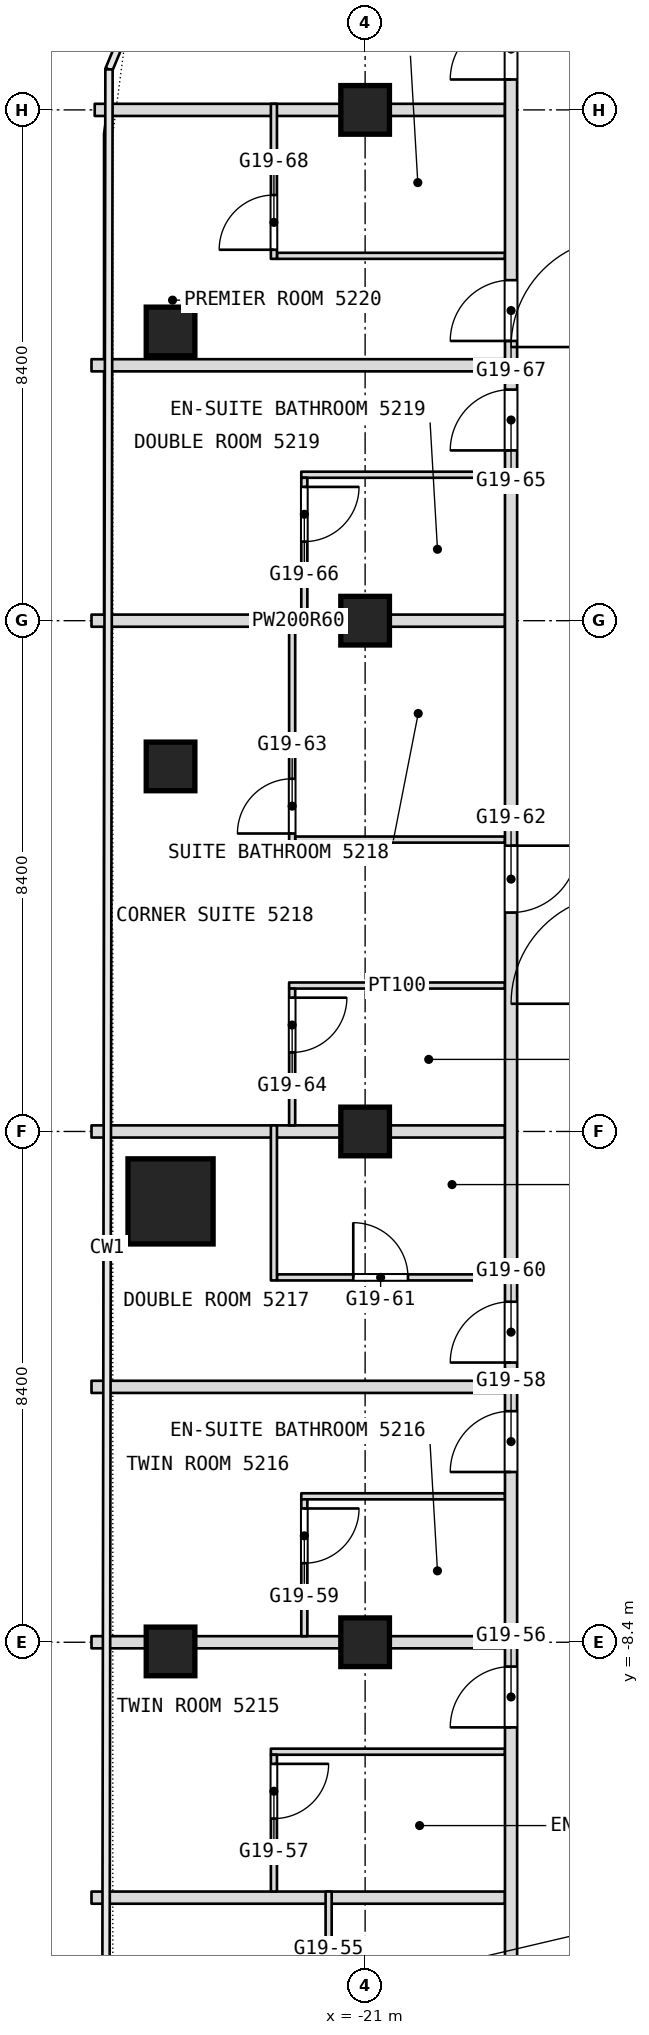
"""IFC4 building model, lengths in metres.
Left out: names, types, materials, properties, quantities, classifications, styles, units other than length and angle.
Written with IfcOpenShell. Run it as: python <this file> out.ifc"""

import sys

from ifc_helpers import new_model, si_unit, direction, frame, frame_2d, origin, origin_2d, place, context, subcontext, project, spatial, rectangle, extrude, element, fill, save


model = new_model("IFC4")
c1 = context("Model", 3, precision=1e-05, world=origin(), true_north=direction((0.0, 1.0)))
c2 = subcontext(c1, "Body", "Model", "MODEL_VIEW")
j1 = project(units=[si_unit("LENGTHUNIT", "METRE"), si_unit("PLANEANGLEUNIT", "RADIAN")], contexts=[c1])
p1 = place(None, origin())
s1 = spatial("IfcSite", under=j1, at=p1, CompositionType="ELEMENT")
p2 = place(p1, origin())
s2 = spatial("IfcBuilding", under=s1, at=p2, CompositionType="ELEMENT")
p3 = place(p2, frame((0.0, 0.0, 223.7)))
s3 = spatial("IfcBuildingStorey", under=s2, at=p3, CompositionType="ELEMENT", Elevation=223.7)
p4 = place(p3, frame((-24.2, -1.15, 0.0), z_axis=(0.0, 0.0, 1.0), x_axis=(1.0, 0.0, 0.0)))
e1 = element("IfcColumn", 1, at=p4, inside=s3, PredefinedType="COLUMN", context=c2, shape_type="SweptSolid", body=[
    extrude(rectangle(XDim=1.4, YDim=1.4, at=origin_2d()), origin(), (0.0, 0.0, 1.0), 3.6),
])
for number, where, z_axis, x_axis in (
    (2, (-21.0, -8.4, 0.0), (0.0, 0.0, 1.0), (1.0, 0.0, 0.0)),
    (3, (-21.0, 0.0, 0.0), (0.0, 0.0, 1.0), (1.0, 0.0, 0.0)),
    (4, (-21.0, 8.4, 0.0), (0.0, 0.0, 1.0), (1.0, 0.0, 0.0)),
    (5, (-21.0, 16.8, 0.0), (0.0, 0.0, 1.0), (1.0, 0.0, 0.0)),
    (6, (-24.2, -8.551, 0.0), (0.0, 0.0, 1.0), (1.0, 0.0, 0.0)),
    (7, (-24.2, 6.003, 0.0), (0.0, 0.0, 1.0), (1.0, 0.0, 0.0)),
    (8, (-24.2, 13.156, 0.0), (0.0, 0.0, 1.0), (1.0, 0.0, 0.0)),
):
    element("IfcColumn", number, at=place(p3, frame(where, z_axis=z_axis, x_axis=x_axis)), inside=s3, PredefinedType="COLUMN", context=c2, shape_type="SweptSolid", body=[
        extrude(rectangle(XDim=0.8, YDim=0.8, at=origin_2d()), origin(), (0.0, 0.0, 1.0), 3.6),
    ])
p5 = place(p3, frame((-25.5, -12.6, 0.0), z_axis=(0.0, 0.0, 1.0), x_axis=(1.0, 0.0, 0.0)))
e9 = element("IfcWall", 9, at=p5, inside=s3, PredefinedType="PARTITIONING", context=c2, shape_type="SweptSolid", body=[
    extrude(rectangle(XDim=6.8, YDim=0.2, at=frame_2d((3.4, 0.0))), origin(), (0.0, 0.0, 1.0), 3.34),
])
p6 = place(p3, frame((-22.55, -10.2, 0.0), z_axis=(0.0, 0.0, 1.0), x_axis=(1.0, 0.0, 0.0)))
e10 = element("IfcWall", 10, at=p6, inside=s3, PredefinedType="PARTITIONING", context=c2, shape_type="SweptSolid", body=[
    extrude(rectangle(XDim=3.85, YDim=0.1, at=frame_2d((1.925, 0.0))), origin(), (0.0, 0.0, 1.0), 3.34),
])
p7 = place(p3, frame((-25.5, -8.4, 0.0), z_axis=(0.0, 0.0, 1.0), x_axis=(1.0, 0.0, 0.0)))
e11 = element("IfcWall", 11, at=p7, inside=s3, PredefinedType="PARTITIONING", context=c2, shape_type="SweptSolid", body=[
    extrude(rectangle(XDim=6.8, YDim=0.2, at=frame_2d((3.4, 0.0))), origin(), (0.0, 0.0, 1.0), 2.94),
])
p8 = place(p3, frame((-22.05, -6.0, 0.0), z_axis=(0.0, 0.0, 1.0), x_axis=(1.0, 0.0, 0.0)))
e12 = element("IfcWall", 12, at=p8, inside=s3, PredefinedType="PARTITIONING", context=c2, shape_type="SweptSolid", body=[
    extrude(rectangle(XDim=3.35, YDim=0.1, at=frame_2d((1.675, 0.0))), origin(), (0.0, 0.0, 1.0), 3.34),
])
p9 = place(p3, frame((-25.5, -4.2, 0.0), z_axis=(0.0, 0.0, 1.0), x_axis=(1.0, 0.0, 0.0)))
e13 = element("IfcWall", 13, at=p9, inside=s3, PredefinedType="PARTITIONING", context=c2, shape_type="SweptSolid", body=[
    extrude(rectangle(XDim=6.8, YDim=0.2, at=frame_2d((3.4, 0.0))), origin(), (0.0, 0.0, 1.0), 3.34),
])
p10 = place(p3, frame((-22.45, -2.4, 0.0), z_axis=(0.0, 0.0, 1.0), x_axis=(1.0, 0.0, 0.0)))
e14 = element("IfcWall", 14, at=p10, inside=s3, PredefinedType="PARTITIONING", context=c2, shape_type="SweptSolid", body=[
    extrude(rectangle(XDim=3.75, YDim=0.1, at=frame_2d((1.875, 0.0))), origin(), (0.0, 0.0, 1.0), 3.34),
])
p11 = place(p10, frame((1.255, 0.0, 0.0)))
e15 = element("IfcOpeningElement", 15, at=p11, cuts=e14, PredefinedType="OPENING", context=c2, shape_type="SweptSolid", body=[
    extrude(rectangle(XDim=0.9, YDim=2.1, at=frame_2d((0.45, 1.05))), frame((0.0, 0.05, 0.0), z_axis=(0.0, -1.0, 0.0), x_axis=(1.0, 0.0, 0.0)), (0.0, 0.0, 1.0), 0.1),
])
p12 = place(p3, frame((-25.5, 0.0, 0.0), z_axis=(0.0, 0.0, 1.0), x_axis=(1.0, 0.0, 0.0)))
e16 = element("IfcWall", 16, at=p12, inside=s3, PredefinedType="PARTITIONING", context=c2, shape_type="SweptSolid", body=[
    extrude(rectangle(XDim=6.8, YDim=0.2, at=frame_2d((3.4, 0.0))), origin(), (0.0, 0.0, 1.0), 2.94),
])
p13 = place(p3, frame((-22.25, 2.4, 0.0), z_axis=(0.0, 0.0, 1.0), x_axis=(1.0, 0.0, 0.0)))
e17 = element("IfcWall", 17, at=p13, inside=s3, PredefinedType="PARTITIONING", context=c2, shape_type="SweptSolid", body=[
    extrude(rectangle(XDim=3.55, YDim=0.1, at=frame_2d((1.775, 0.0))), origin(), (0.0, 0.0, 1.0), 3.34),
])
p14 = place(p3, frame((-22.15, 4.8, 0.0), z_axis=(0.0, 0.0, 1.0), x_axis=(1.0, 0.0, 0.0)))
e18 = element("IfcWall", 18, at=p14, inside=s3, PredefinedType="PARTITIONING", context=c2, shape_type="SweptSolid", body=[
    extrude(rectangle(XDim=3.45, YDim=0.1, at=frame_2d((1.725, 0.0))), origin(), (0.0, 0.0, 1.0), 3.34),
])
p15 = place(p3, frame((-25.5, 8.4, 0.0), z_axis=(0.0, 0.0, 1.0), x_axis=(1.0, 0.0, 0.0)))
e19 = element("IfcWall", 19, at=p15, inside=s3, PredefinedType="PARTITIONING", context=c2, shape_type="SweptSolid", body=[
    extrude(rectangle(XDim=6.8, YDim=0.2, at=frame_2d((3.4, 0.0))), origin(), (0.0, 0.0, 1.0), 2.94),
])
p16 = place(p3, frame((-22.05, 10.8, 0.0), z_axis=(0.0, 0.0, 1.0), x_axis=(1.0, 0.0, 0.0)))
e20 = element("IfcWall", 20, at=p16, inside=s3, PredefinedType="PARTITIONING", context=c2, shape_type="SweptSolid", body=[
    extrude(rectangle(XDim=3.35, YDim=0.1, at=frame_2d((1.675, 0.0))), origin(), (0.0, 0.0, 1.0), 3.34),
])
p17 = place(p3, frame((-25.5, 12.6, 0.0), z_axis=(0.0, 0.0, 1.0), x_axis=(1.0, 0.0, 0.0)))
e21 = element("IfcWall", 21, at=p17, inside=s3, PredefinedType="PARTITIONING", context=c2, shape_type="SweptSolid", body=[
    extrude(rectangle(XDim=6.8, YDim=0.2, at=frame_2d((3.4, 0.0))), origin(), (0.0, 0.0, 1.0), 3.34),
])
p18 = place(p3, frame((-22.45, 14.4, 0.0), z_axis=(0.0, 0.0, 1.0), x_axis=(1.0, 0.0, 0.0)))
e22 = element("IfcWall", 22, at=p18, inside=s3, PredefinedType="PARTITIONING", context=c2, shape_type="SweptSolid", body=[
    extrude(rectangle(XDim=3.75, YDim=0.1, at=frame_2d((1.875, 0.0))), origin(), (0.0, 0.0, 1.0), 3.34),
])
p19 = place(p3, frame((-25.447, 16.8, 0.0), z_axis=(0.0, 0.0, 1.0), x_axis=(1.0, 0.0, 0.0)))
e23 = element("IfcWall", 23, at=p19, inside=s3, PredefinedType="PARTITIONING", context=c2, shape_type="SweptSolid", body=[
    extrude(rectangle(XDim=6.747, YDim=0.2, at=frame_2d((3.374, 0.0))), origin(), (0.0, 0.0, 1.0), 2.94),
])
p20 = place(p3, frame((-18.6, -26.751, 0.0), z_axis=(0.0, 0.0, 1.0), x_axis=(0.0, 1.0, 0.0)))
e24 = element("IfcWall", 24, at=p20, inside=s3, PredefinedType="PARTITIONING", context=c2, shape_type="SweptSolid", body=[
    extrude(rectangle(XDim=49.091, YDim=0.2, at=frame_2d((24.545, 0.0))), origin(), (0.0, 0.0, 1.0), 3.34),
])
p21 = place(p20, frame((3.413, 0.0, 0.0)))
e25 = element("IfcOpeningElement", 25, at=p21, cuts=e24, PredefinedType="OPENING", context=c2, shape_type="SweptSolid", body=[
    extrude(rectangle(XDim=1.0, YDim=2.1, at=frame_2d((0.5, 1.05))), frame((0.0, 0.1, 0.0), z_axis=(0.0, -1.0, 0.0), x_axis=(1.0, 0.0, 0.0)), (0.0, 0.0, 1.0), 0.2),
])
p22 = place(p20, frame((5.838, 0.0, 0.0)))
e26 = element("IfcOpeningElement", 26, at=p22, cuts=e24, PredefinedType="OPENING", context=c2, shape_type="SweptSolid", body=[
    extrude(rectangle(XDim=1.0, YDim=2.1, at=frame_2d((0.5, 1.05))), frame((0.0, 0.1, 0.0), z_axis=(0.0, -1.0, 0.0), x_axis=(1.0, 0.0, 0.0)), (0.0, 0.0, 1.0), 0.2),
])
p23 = place(p20, frame((10.351, 0.0, 0.0)))
e27 = element("IfcOpeningElement", 27, at=p23, cuts=e24, PredefinedType="OPENING", context=c2, shape_type="SweptSolid", body=[
    extrude(rectangle(XDim=1.0, YDim=2.1, at=frame_2d((0.5, 1.05))), frame((0.0, 0.1, 0.0), z_axis=(0.0, -1.0, 0.0), x_axis=(1.0, 0.0, 0.0)), (0.0, 0.0, 1.0), 0.2),
])
p24 = place(p20, frame((16.951, 0.0, 0.0)))
e28 = element("IfcOpeningElement", 28, at=p24, cuts=e24, PredefinedType="OPENING", context=c2, shape_type="SweptSolid", body=[
    extrude(rectangle(XDim=1.0, YDim=2.1, at=frame_2d((0.5, 1.05))), frame((0.0, 0.1, 0.0), z_axis=(0.0, -1.0, 0.0), x_axis=(1.0, 0.0, 0.0)), (0.0, 0.0, 1.0), 0.2),
])
p25 = place(p20, frame((21.151, 0.0, 0.0)))
e29 = element("IfcOpeningElement", 29, at=p25, cuts=e24, PredefinedType="OPENING", context=c2, shape_type="SweptSolid", body=[
    extrude(rectangle(XDim=1.0, YDim=2.1, at=frame_2d((0.5, 1.05))), frame((0.0, 0.1, 0.0), z_axis=(0.0, -1.0, 0.0), x_axis=(1.0, 0.0, 0.0)), (0.0, 0.0, 1.0), 0.2),
])
p26 = place(p20, frame((22.951, 0.0, 0.0)))
e30 = element("IfcOpeningElement", 30, at=p26, cuts=e24, PredefinedType="OPENING", context=c2, shape_type="SweptSolid", body=[
    extrude(rectangle(XDim=1.0, YDim=2.1, at=frame_2d((0.5, 1.05))), frame((0.0, 0.1, 0.0), z_axis=(0.0, -1.0, 0.0), x_axis=(1.0, 0.0, 0.0)), (0.0, 0.0, 1.0), 0.2),
])
p27 = place(p20, frame((30.351, 0.0, 0.0)))
e31 = element("IfcOpeningElement", 31, at=p27, cuts=e24, PredefinedType="OPENING", context=c2, shape_type="SweptSolid", body=[
    extrude(rectangle(XDim=1.1, YDim=2.1, at=frame_2d((0.55, 1.05))), frame((0.0, 0.1, 0.0), z_axis=(0.0, -1.0, 0.0), x_axis=(1.0, 0.0, 0.0)), (0.0, 0.0, 1.0), 0.2),
])
p28 = place(p20, frame((37.951, 0.0, 0.0)))
e32 = element("IfcOpeningElement", 32, at=p28, cuts=e24, PredefinedType="OPENING", context=c2, shape_type="SweptSolid", body=[
    extrude(rectangle(XDim=1.0, YDim=2.1, at=frame_2d((0.5, 1.05))), frame((0.0, 0.1, 0.0), z_axis=(0.0, -1.0, 0.0), x_axis=(1.0, 0.0, 0.0)), (0.0, 0.0, 1.0), 0.2),
])
p29 = place(p20, frame((39.751, 0.0, 0.0)))
e33 = element("IfcOpeningElement", 33, at=p29, cuts=e24, PredefinedType="OPENING", context=c2, shape_type="SweptSolid", body=[
    extrude(rectangle(XDim=1.0, YDim=2.1, at=frame_2d((0.5, 1.05))), frame((0.0, 0.1, 0.0), z_axis=(0.0, -1.0, 0.0), x_axis=(1.0, 0.0, 0.0)), (0.0, 0.0, 1.0), 0.2),
])
p30 = place(p20, frame((44.051, 0.0, 0.0)))
e34 = element("IfcOpeningElement", 34, at=p30, cuts=e24, PredefinedType="OPENING", context=c2, shape_type="SweptSolid", body=[
    extrude(rectangle(XDim=1.0, YDim=2.1, at=frame_2d((0.5, 1.05))), frame((0.0, 0.1, 0.0), z_axis=(0.0, -1.0, 0.0), x_axis=(1.0, 0.0, 0.0)), (0.0, 0.0, 1.0), 0.2),
])
p31 = place(p3, frame((-21.6, -15.05, 0.0), z_axis=(0.0, 0.0, 1.0), x_axis=(0.0, 1.0, 0.0)))
e35 = element("IfcWall", 35, at=p31, inside=s3, PredefinedType="PARTITIONING", context=c2, shape_type="SweptSolid", body=[
    extrude(rectangle(XDim=2.55, YDim=0.1, at=frame_2d((1.275, 0.0))), origin(), (0.0, 0.0, 1.0), 3.34),
])
p32 = place(p31, frame((0.15, 0.0, 0.0)))
e36 = element("IfcOpeningElement", 36, at=p32, cuts=e35, PredefinedType="OPENING", context=c2, shape_type="SweptSolid", body=[
    extrude(rectangle(XDim=0.9, YDim=2.1, at=frame_2d((0.45, 1.05))), frame((0.0, 0.05, 0.0), z_axis=(0.0, -1.0, 0.0), x_axis=(1.0, 0.0, 0.0)), (0.0, 0.0, 1.0), 0.1),
])
p33 = place(p3, frame((-22.0, -8.3, 0.0), z_axis=(0.0, 0.0, 1.0), x_axis=(0.0, 1.0, 0.0)))
e37 = element("IfcWall", 37, at=p33, inside=s3, PredefinedType="PARTITIONING", context=c2, shape_type="SweptSolid", body=[
    extrude(rectangle(XDim=2.25, YDim=0.1, at=frame_2d((1.125, 0.0))), origin(), (0.0, 0.0, 1.0), 3.34),
])
p34 = place(p33, frame((1.2, 0.0, 0.0)))
e38 = element("IfcOpeningElement", 38, at=p34, cuts=e37, PredefinedType="OPENING", context=c2, shape_type="SweptSolid", body=[
    extrude(rectangle(XDim=0.9, YDim=2.1, at=frame_2d((0.45, 1.05))), frame((0.0, 0.05, 0.0), z_axis=(0.0, -1.0, 0.0), x_axis=(1.0, 0.0, 0.0)), (0.0, 0.0, 1.0), 0.1),
])
p35 = place(p3, frame((-22.0, 8.5, 0.0), z_axis=(0.0, 0.0, 1.0), x_axis=(0.0, 1.0, 0.0)))
e39 = element("IfcWall", 39, at=p35, inside=s3, PredefinedType="PARTITIONING", context=c2, shape_type="SweptSolid", body=[
    extrude(rectangle(XDim=2.25, YDim=0.1, at=frame_2d((1.125, 0.0))), origin(), (0.0, 0.0, 1.0), 3.34),
])
p36 = place(p35, frame((1.2, 0.0, 0.0)))
e40 = element("IfcOpeningElement", 40, at=p36, cuts=e39, PredefinedType="OPENING", context=c2, shape_type="SweptSolid", body=[
    extrude(rectangle(XDim=0.9, YDim=2.1, at=frame_2d((0.45, 1.05))), frame((0.0, 0.05, 0.0), z_axis=(0.0, -1.0, 0.0), x_axis=(1.0, 0.0, 0.0)), (0.0, 0.0, 1.0), 0.1),
])
p37 = place(p3, frame((-22.2, 0.1, 0.0), z_axis=(0.0, 0.0, 1.0), x_axis=(0.0, 1.0, 0.0)))
e41 = element("IfcWall", 41, at=p37, inside=s3, PredefinedType="PARTITIONING", context=c2, shape_type="SweptSolid", body=[
    extrude(rectangle(XDim=2.25, YDim=0.1, at=frame_2d((1.125, 0.0))), origin(), (0.0, 0.0, 1.0), 3.34),
])
p38 = place(p37, frame((1.2, 0.0, 0.0)))
e42 = element("IfcOpeningElement", 42, at=p38, cuts=e41, PredefinedType="OPENING", context=c2, shape_type="SweptSolid", body=[
    extrude(rectangle(XDim=0.9, YDim=2.1, at=frame_2d((0.45, 1.05))), frame((0.0, 0.05, 0.0), z_axis=(0.0, -1.0, 0.0), x_axis=(1.0, 0.0, 0.0)), (0.0, 0.0, 1.0), 0.1),
])
p39 = place(p3, frame((-22.2, 4.75, 0.0), z_axis=(0.0, 0.0, 1.0), x_axis=(0.0, 1.0, 0.0)))
e43 = element("IfcWall", 43, at=p39, inside=s3, PredefinedType="PARTITIONING", context=c2, shape_type="SweptSolid", body=[
    extrude(rectangle(XDim=3.75, YDim=0.1, at=frame_2d((1.875, 0.0))), origin(), (0.0, 0.0, 1.0), 3.34),
])
p40 = place(p39, frame((0.15, 0.0, 0.0)))
e44 = element("IfcOpeningElement", 44, at=p40, cuts=e43, PredefinedType="OPENING", context=c2, shape_type="SweptSolid", body=[
    extrude(rectangle(XDim=0.9, YDim=2.1, at=frame_2d((0.45, 1.05))), frame((0.0, 0.05, 0.0), z_axis=(0.0, -1.0, 0.0), x_axis=(1.0, 0.0, 0.0)), (0.0, 0.0, 1.0), 0.1),
])
p41 = place(p3, frame((-22.5, -12.5, 0.0), z_axis=(0.0, 0.0, 1.0), x_axis=(0.0, 1.0, 0.0)))
e45 = element("IfcWall", 45, at=p41, inside=s3, PredefinedType="PARTITIONING", context=c2, shape_type="SweptSolid", body=[
    extrude(rectangle(XDim=2.25, YDim=0.1, at=frame_2d((1.125, 0.0))), origin(), (0.0, 0.0, 1.0), 3.34),
])
p42 = place(p41, frame((1.2, 0.0, 0.0)))
e46 = element("IfcOpeningElement", 46, at=p42, cuts=e45, PredefinedType="OPENING", context=c2, shape_type="SweptSolid", body=[
    extrude(rectangle(XDim=0.9, YDim=2.1, at=frame_2d((0.45, 1.05))), frame((0.0, 0.05, 0.0), z_axis=(0.0, -1.0, 0.0), x_axis=(1.0, 0.0, 0.0)), (0.0, 0.0, 1.0), 0.1),
])
p43 = place(p3, frame((-22.5, -2.45, 0.0), z_axis=(0.0, 0.0, 1.0), x_axis=(0.0, 1.0, 0.0)))
e47 = element("IfcWall", 47, at=p43, inside=s3, PredefinedType="PARTITIONING", context=c2, shape_type="SweptSolid", body=[
    extrude(rectangle(XDim=2.55, YDim=0.1, at=frame_2d((1.275, 0.0))), origin(), (0.0, 0.0, 1.0), 3.34),
])
p44 = place(p3, frame((-22.5, 14.35, 0.0), z_axis=(0.0, 0.0, 1.0), x_axis=(0.0, 1.0, 0.0)))
e48 = element("IfcWall", 48, at=p44, inside=s3, PredefinedType="PARTITIONING", context=c2, shape_type="SweptSolid", body=[
    extrude(rectangle(XDim=2.55, YDim=0.1, at=frame_2d((1.275, 0.0))), origin(), (0.0, 0.0, 1.0), 3.34),
])
p45 = place(p44, frame((0.15, 0.0, 0.0)))
e49 = element("IfcOpeningElement", 49, at=p45, cuts=e48, PredefinedType="OPENING", context=c2, shape_type="SweptSolid", body=[
    extrude(rectangle(XDim=0.9, YDim=2.1, at=frame_2d((0.45, 1.05))), frame((0.0, 0.05, 0.0), z_axis=(0.0, -1.0, 0.0), x_axis=(1.0, 0.0, 0.0)), (0.0, 0.0, 1.0), 0.1),
])
p46 = place(p11, origin())
e50 = element("IfcDoor", 50, at=p46, inside=s3, OperationType="SINGLE_SWING_LEFT", PredefinedType="DOOR", context=c2, shape_type="SweptSolid", body=[
    extrude(rectangle(XDim=0.9, YDim=2.1, at=frame_2d((0.45, 1.05))), frame((0.0, 0.025, 0.0), z_axis=(0.0, -1.0, 0.0), x_axis=(1.0, 0.0, 0.0)), (0.0, 0.0, 1.0), 0.05),
])
fill(e15, e50)
p47 = place(p24, origin())
e51 = element("IfcDoor", 51, at=p47, inside=s3, OperationType="SINGLE_SWING_LEFT", PredefinedType="DOOR", context=c2, shape_type="SweptSolid", body=[
    extrude(rectangle(XDim=1.0, YDim=2.1, at=frame_2d((0.5, 1.05))), frame((0.0, 0.025, 0.0), z_axis=(0.0, -1.0, 0.0), x_axis=(1.0, 0.0, 0.0)), (0.0, 0.0, 1.0), 0.05),
])
fill(e28, e51)
p48 = place(p25, origin())
e52 = element("IfcDoor", 52, at=p48, inside=s3, OperationType="SINGLE_SWING_LEFT", PredefinedType="DOOR", context=c2, shape_type="SweptSolid", body=[
    extrude(rectangle(XDim=1.0, YDim=2.1, at=frame_2d((0.5, 1.05))), frame((0.0, 0.025, 0.0), z_axis=(0.0, -1.0, 0.0), x_axis=(1.0, 0.0, 0.0)), (0.0, 0.0, 1.0), 0.05),
])
fill(e29, e52)
p49 = place(p26, origin())
e53 = element("IfcDoor", 53, at=p49, inside=s3, OperationType="SINGLE_SWING_LEFT", PredefinedType="DOOR", context=c2, shape_type="SweptSolid", body=[
    extrude(rectangle(XDim=1.0, YDim=2.1, at=frame_2d((0.5, 1.05))), frame((0.0, 0.025, 0.0), z_axis=(0.0, -1.0, 0.0), x_axis=(1.0, 0.0, 0.0)), (0.0, 0.0, 1.0), 0.05),
])
fill(e30, e53)
p50 = place(p27, origin())
e54 = element("IfcDoor", 54, at=p50, inside=s3, OperationType="SINGLE_SWING_RIGHT", PredefinedType="DOOR", context=c2, shape_type="SweptSolid", body=[
    extrude(rectangle(XDim=1.1, YDim=2.1, at=frame_2d((0.55, 1.05))), frame((0.0, 0.025, 0.0), z_axis=(0.0, -1.0, 0.0), x_axis=(1.0, 0.0, 0.0)), (0.0, 0.0, 1.0), 0.05),
])
fill(e31, e54)
p51 = place(p28, origin())
e55 = element("IfcDoor", 55, at=p51, inside=s3, OperationType="SINGLE_SWING_RIGHT", PredefinedType="DOOR", context=c2, shape_type="SweptSolid", body=[
    extrude(rectangle(XDim=1.0, YDim=2.1, at=frame_2d((0.5, 1.05))), frame((0.0, 0.025, 0.0), z_axis=(0.0, -1.0, 0.0), x_axis=(1.0, 0.0, 0.0)), (0.0, 0.0, 1.0), 0.05),
])
fill(e32, e55)
p52 = place(p29, origin())
e56 = element("IfcDoor", 56, at=p52, inside=s3, OperationType="SINGLE_SWING_RIGHT", PredefinedType="DOOR", context=c2, shape_type="SweptSolid", body=[
    extrude(rectangle(XDim=1.0, YDim=2.1, at=frame_2d((0.5, 1.05))), frame((0.0, 0.025, 0.0), z_axis=(0.0, -1.0, 0.0), x_axis=(1.0, 0.0, 0.0)), (0.0, 0.0, 1.0), 0.05),
])
fill(e33, e56)
p53 = place(p30, origin())
e57 = element("IfcDoor", 57, at=p53, inside=s3, OperationType="SINGLE_SWING_RIGHT", PredefinedType="DOOR", context=c2, shape_type="SweptSolid", body=[
    extrude(rectangle(XDim=1.0, YDim=2.1, at=frame_2d((0.5, 1.05))), frame((0.0, 0.025, 0.0), z_axis=(0.0, -1.0, 0.0), x_axis=(1.0, 0.0, 0.0)), (0.0, 0.0, 1.0), 0.05),
])
fill(e34, e57)
p54 = place(p34, origin())
e58 = element("IfcDoor", 58, at=p54, inside=s3, OperationType="SINGLE_SWING_LEFT", PredefinedType="DOOR", context=c2, shape_type="SweptSolid", body=[
    extrude(rectangle(XDim=0.9, YDim=2.1, at=frame_2d((0.45, 1.05))), frame((0.0, 0.025, 0.0), z_axis=(0.0, -1.0, 0.0), x_axis=(1.0, 0.0, 0.0)), (0.0, 0.0, 1.0), 0.05),
])
fill(e38, e58)
p55 = place(p36, origin())
e59 = element("IfcDoor", 59, at=p55, inside=s3, OperationType="SINGLE_SWING_LEFT", PredefinedType="DOOR", context=c2, shape_type="SweptSolid", body=[
    extrude(rectangle(XDim=0.9, YDim=2.1, at=frame_2d((0.45, 1.05))), frame((0.0, 0.025, 0.0), z_axis=(0.0, -1.0, 0.0), x_axis=(1.0, 0.0, 0.0)), (0.0, 0.0, 1.0), 0.05),
])
fill(e40, e59)
p56 = place(p38, origin())
e60 = element("IfcDoor", 60, at=p56, inside=s3, OperationType="SINGLE_SWING_LEFT", PredefinedType="DOOR", context=c2, shape_type="SweptSolid", body=[
    extrude(rectangle(XDim=0.9, YDim=2.1, at=frame_2d((0.45, 1.05))), frame((0.0, 0.025, 0.0), z_axis=(0.0, -1.0, 0.0), x_axis=(1.0, 0.0, 0.0)), (0.0, 0.0, 1.0), 0.05),
])
fill(e42, e60)
p57 = place(p40, origin())
e61 = element("IfcDoor", 61, at=p57, inside=s3, OperationType="SINGLE_SWING_RIGHT", PredefinedType="DOOR", context=c2, shape_type="SweptSolid", body=[
    extrude(rectangle(XDim=0.9, YDim=2.1, at=frame_2d((0.45, 1.05))), frame((0.0, 0.025, 0.0), z_axis=(0.0, -1.0, 0.0), x_axis=(1.0, 0.0, 0.0)), (0.0, 0.0, 1.0), 0.05),
])
fill(e44, e61)
p58 = place(p42, origin())
e62 = element("IfcDoor", 62, at=p58, inside=s3, OperationType="SINGLE_SWING_LEFT", PredefinedType="DOOR", context=c2, shape_type="SweptSolid", body=[
    extrude(rectangle(XDim=0.9, YDim=2.1, at=frame_2d((0.45, 1.05))), frame((0.0, 0.025, 0.0), z_axis=(0.0, -1.0, 0.0), x_axis=(1.0, 0.0, 0.0)), (0.0, 0.0, 1.0), 0.05),
])
fill(e46, e62)
p59 = place(p45, origin())
e63 = element("IfcDoor", 63, at=p59, inside=s3, OperationType="SINGLE_SWING_RIGHT", PredefinedType="DOOR", context=c2, shape_type="SweptSolid", body=[
    extrude(rectangle(XDim=0.9, YDim=2.1, at=frame_2d((0.45, 1.05))), frame((0.0, 0.025, 0.0), z_axis=(0.0, -1.0, 0.0), x_axis=(1.0, 0.0, 0.0)), (0.0, 0.0, 1.0), 0.05),
])
fill(e49, e63)
save(model, sys.argv[1])
